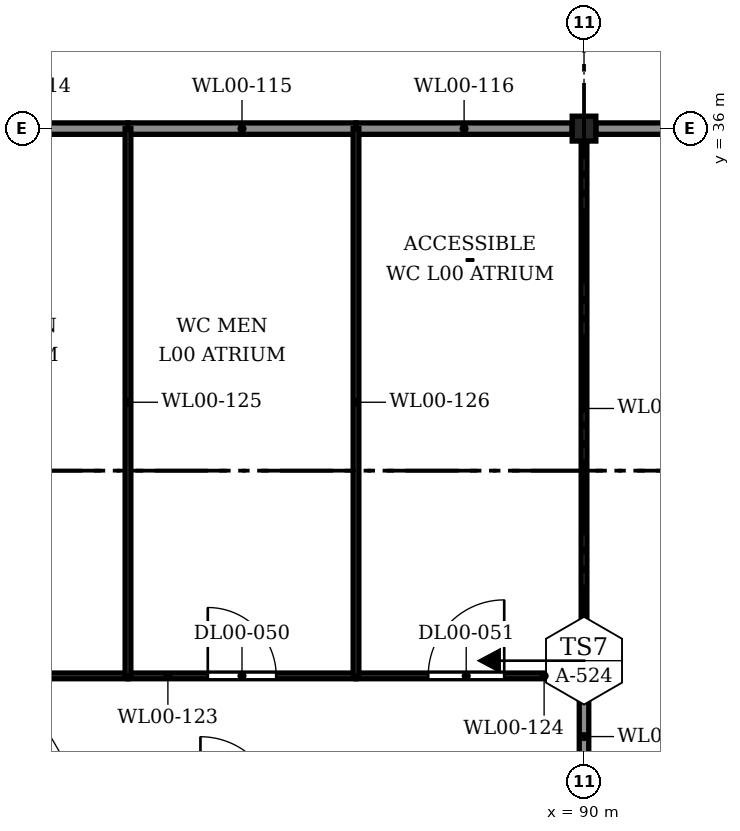
"""IFC4 building model, lengths in metres.
Left out: names, types, materials, properties, quantities, classifications, styles, units other than length and angle.
Written with IfcOpenShell. Run it as: python <this file> out.ifc"""

import sys

from ifc_helpers import new_model, si_unit, direction, frame, frame_2d, origin, origin_2d, place, context, subcontext, project, spatial, rectangle, i_section, extrude, element, fill, save


model = new_model("IFC4")
c1 = context("Model", 3, precision=1e-05, world=origin(), true_north=direction((0.0, 1.0)))
c2 = subcontext(c1, "Body", "Model", "MODEL_VIEW")
j1 = project(units=[si_unit("LENGTHUNIT", "METRE"), si_unit("PLANEANGLEUNIT", "RADIAN")], contexts=[c1])
p1 = place(None, origin())
s1 = spatial("IfcSite", under=j1, at=p1, CompositionType="ELEMENT")
p2 = place(p1, origin())
s2 = spatial("IfcBuilding", under=s1, at=p2, CompositionType="ELEMENT")
p3 = place(p2, origin())
s3 = spatial("IfcBuildingStorey", under=s2, at=p3, CompositionType="ELEMENT", Elevation=0.0)
p4 = place(p3, frame((90.0, 36.0, 0.0), z_axis=(0.0, 0.0, 1.0), x_axis=(1.0, 0.0, 0.0)))
e1 = element("IfcColumn", 1, at=p4, inside=s3, PredefinedType="COLUMN", context=c2, shape_type="SweptSolid", body=[
    extrude(i_section(OverallWidth=0.311, OverallDepth=0.327, WebThickness=0.016, FlangeThickness=0.025, FilletRadius=0.017, at=origin_2d()), origin(), (0.0, 0.0, 1.0), 5.0),
])
p5 = place(p3, frame((90.156, 36.0, 0.0), z_axis=(0.0, 0.0, 1.0), x_axis=(1.0, 0.0, 0.0)))
e2 = element("IfcWall", 2, at=p5, inside=s3, PredefinedType="PARTITIONING", context=c2, shape_type="SweptSolid", body=[
    extrude(rectangle(XDim=8.669, YDim=0.15, at=frame_2d((4.335, 0.0))), origin(), (0.0, 0.0, 1.0), 3.958),
])
p6 = place(p3, frame((90.0, 27.203, 0.0), z_axis=(0.0, 0.0, 1.0), x_axis=(0.0, 1.0, 0.0)))
e3 = element("IfcWall", 3, at=p6, inside=s3, PredefinedType="PARTITIONING", context=c2, shape_type="SweptSolid", body=[
    extrude(rectangle(XDim=1.597, YDim=0.125, at=frame_2d((0.798, 0.0))), origin(), (0.0, 0.0, 1.0), 4.302),
])
p7 = place(p3, frame((90.0, 28.8, 0.0), z_axis=(0.0, 0.0, 1.0), x_axis=(0.0, 1.0, 0.0)))
e4 = element("IfcWall", 4, at=p7, inside=s3, PredefinedType="PARTITIONING", context=c2, shape_type="SweptSolid", body=[
    extrude(rectangle(XDim=7.036, YDim=0.075, at=frame_2d((3.518, 0.0))), origin(), (0.0, 0.0, 1.0), 4.302),
])
p8 = place(p3, frame((81.175, 36.0, 0.0), z_axis=(0.0, 0.0, 1.0), x_axis=(1.0, 0.0, 0.0)))
e5 = element("IfcWall", 5, at=p8, inside=s3, PredefinedType="PARTITIONING", context=c2, shape_type="SweptSolid", body=[
    extrude(rectangle(XDim=2.825, YDim=0.15, at=frame_2d((1.413, 0.0))), origin(), (0.0, 0.0, 1.0), 3.958),
])
p9 = place(p3, frame((84.0, 36.0, 0.0), z_axis=(0.0, 0.0, 1.0), x_axis=(1.0, 0.0, 0.0)))
e6 = element("IfcWall", 6, at=p9, inside=s3, PredefinedType="PARTITIONING", context=c2, shape_type="SweptSolid", body=[
    extrude(rectangle(XDim=3.0, YDim=0.15, at=frame_2d((1.5, 0.0))), origin(), (0.0, 0.0, 1.0), 3.958),
])
p10 = place(p3, frame((87.0, 36.0, 0.0), z_axis=(0.0, 0.0, 1.0), x_axis=(1.0, 0.0, 0.0)))
e7 = element("IfcWall", 7, at=p10, inside=s3, PredefinedType="PARTITIONING", context=c2, shape_type="SweptSolid", body=[
    extrude(rectangle(XDim=2.844, YDim=0.15, at=frame_2d((1.422, 0.0))), origin(), (0.0, 0.0, 1.0), 3.958),
])
p11 = place(p3, frame((81.0, 28.8, 0.0), z_axis=(0.0, 0.0, 1.0), x_axis=(1.0, 0.0, 0.0)))
e8 = element("IfcWall", 8, at=p11, inside=s3, PredefinedType="PARTITIONING", context=c2, shape_type="SweptSolid", body=[
    extrude(rectangle(XDim=3.0, YDim=0.075, at=frame_2d((1.5, 0.0))), origin(), (0.0, 0.0, 1.0), 4.302),
])
p12 = place(p11, frame((1.073, 0.0, 0.0)))
e9 = element("IfcOpeningElement", 9, at=p12, cuts=e8, PredefinedType="OPENING", context=c2, shape_type="SweptSolid", body=[
    extrude(rectangle(XDim=0.9, YDim=2.1, at=frame_2d((0.45, 1.05))), frame((0.0, 0.047, 0.0), z_axis=(0.0, -1.0, 0.0), x_axis=(1.0, 0.0, 0.0)), (0.0, 0.0, 1.0), 0.095),
])
p13 = place(p3, frame((84.0, 28.8, 0.0), z_axis=(0.0, 0.0, 1.0), x_axis=(1.0, 0.0, 0.0)))
e10 = element("IfcWall", 10, at=p13, inside=s3, PredefinedType="PARTITIONING", context=c2, shape_type="SweptSolid", body=[
    extrude(rectangle(XDim=3.0, YDim=0.075, at=frame_2d((1.5, 0.0))), origin(), (0.0, 0.0, 1.0), 4.429),
])
p14 = place(p13, frame((1.05, 0.0, 0.0)))
e11 = element("IfcOpeningElement", 11, at=p14, cuts=e10, PredefinedType="OPENING", context=c2, shape_type="SweptSolid", body=[
    extrude(rectangle(XDim=0.9, YDim=2.1, at=frame_2d((0.45, 1.05))), frame((0.0, 0.047, 0.0), z_axis=(0.0, -1.0, 0.0), x_axis=(1.0, 0.0, 0.0)), (0.0, 0.0, 1.0), 0.095),
])
p15 = place(p3, frame((87.0, 28.8, 0.0), z_axis=(0.0, 0.0, 1.0), x_axis=(1.0, 0.0, 0.0)))
e12 = element("IfcWall", 12, at=p15, inside=s3, PredefinedType="PARTITIONING", context=c2, shape_type="SweptSolid", body=[
    extrude(rectangle(XDim=3.0, YDim=0.075, at=frame_2d((1.5, 0.0))), origin(), (0.0, 0.0, 1.0), 4.302),
])
p16 = place(p15, frame((0.95, 0.0, 0.0)))
e13 = element("IfcOpeningElement", 13, at=p16, cuts=e12, PredefinedType="OPENING", context=c2, shape_type="SweptSolid", body=[
    extrude(rectangle(XDim=1.0, YDim=2.1, at=frame_2d((0.5, 1.05))), frame((0.0, 0.047, 0.0), z_axis=(0.0, -1.0, 0.0), x_axis=(1.0, 0.0, 0.0)), (0.0, 0.0, 1.0), 0.095),
])
for number, where, z_axis, x_axis in (
    (14, (84.0, 28.8, 0.0), (0.0, 0.0, 1.0), (0.0, 1.0, 0.0)),
    (15, (87.0, 28.8, 0.0), (0.0, 0.0, 1.0), (0.0, 1.0, 0.0)),
):
    element("IfcWall", number, at=place(p3, frame(where, z_axis=z_axis, x_axis=x_axis)), inside=s3, PredefinedType="PARTITIONING", context=c2, shape_type="SweptSolid", body=[
        extrude(rectangle(XDim=7.2, YDim=0.075, at=frame_2d((3.6, 0.0))), origin(), (0.0, 0.0, 1.0), 3.958),
    ])
p17 = place(p14, origin())
e16 = element("IfcDoor", 16, at=p17, inside=s3, OperationType="SINGLE_SWING_RIGHT", PredefinedType="DOOR", context=c2, shape_type="SweptSolid", body=[
    extrude(rectangle(XDim=0.9, YDim=2.1, at=frame_2d((0.45, 1.05))), frame((0.0, 0.025, 0.0), z_axis=(0.0, -1.0, 0.0), x_axis=(1.0, 0.0, 0.0)), (0.0, 0.0, 1.0), 0.05),
])
fill(e11, e16)
p18 = place(p16, origin())
e17 = element("IfcDoor", 17, at=p18, inside=s3, OperationType="SINGLE_SWING_LEFT", PredefinedType="DOOR", context=c2, shape_type="SweptSolid", body=[
    extrude(rectangle(XDim=1.0, YDim=2.1, at=frame_2d((0.5, 1.05))), frame((0.0, 0.025, 0.0), z_axis=(0.0, -1.0, 0.0), x_axis=(1.0, 0.0, 0.0)), (0.0, 0.0, 1.0), 0.05),
])
fill(e13, e17)
save(model, sys.argv[1])
